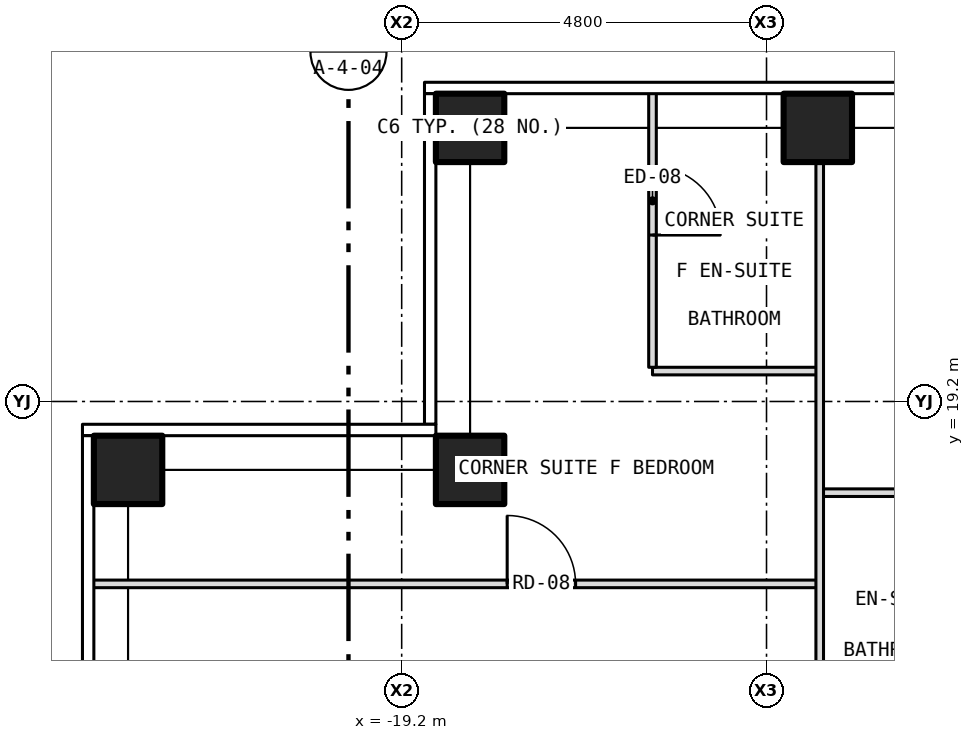
"""IFC4 building model, lengths in metres.
Left out: names, types, materials, properties, quantities, classifications, styles, units other than length and angle.
Written with IfcOpenShell. Run it as: python <this file> out.ifc"""

import sys

from ifc_helpers import new_model, si_unit, direction, frame, frame_2d, origin, origin_2d, place, context, subcontext, project, spatial, rectangle, hollow_rectangle, extrude, element, fill, save


model = new_model("IFC4")
c1 = context("Model", 3, precision=1e-05, world=origin(), true_north=direction((0.0, 1.0)))
c2 = subcontext(c1, "Body", "Model", "MODEL_VIEW")
j1 = project(units=[si_unit("LENGTHUNIT", "METRE"), si_unit("PLANEANGLEUNIT", "RADIAN")], contexts=[c1])
p1 = place(None, origin())
s1 = spatial("IfcSite", under=j1, at=p1, CompositionType="ELEMENT")
p2 = place(p1, origin())
s2 = spatial("IfcBuilding", under=s1, at=p2, CompositionType="ELEMENT")
p3 = place(p2, frame((0.0, 0.0, 117.0)))
s3 = spatial("IfcBuildingStorey", under=s2, at=p3, CompositionType="ELEMENT", Elevation=117.0)
for number, where, z_axis, x_axis in (
    (1, (-18.3, 22.8, -0.15), (0.0, 0.0, 1.0), (1.0, 0.0, 0.0)),
    (2, (-13.725, 22.8, -0.15), (0.0, 0.0, 1.0), (1.0, 0.0, 0.0)),
    (3, (-22.8, 18.3, -0.15), (0.0, 0.0, 1.0), (1.0, 0.0, 0.0)),
    (4, (-18.3, 18.3, -0.15), (0.0, 0.0, 1.0), (1.0, 0.0, 0.0)),
):
    element("IfcColumn", number, at=place(p3, frame(where, z_axis=z_axis, x_axis=x_axis)), inside=s3, PredefinedType="COLUMN", context=c2, shape_type="SweptSolid", body=[
        extrude(hollow_rectangle(XDim=0.9, YDim=0.9, WallThickness=0.05, at=origin_2d()), origin(), (0.0, 0.0, 1.0), 3.5),
    ])
p4 = place(p3, frame((-23.28, 16.8, 0.0), z_axis=(0.0, 0.0, 1.0), x_axis=(1.0, 0.0, 0.0)))
e5 = element("IfcWall", 5, at=p4, inside=s3, PredefinedType="PARTITIONING", context=c2, shape_type="SweptSolid", body=[
    extrude(rectangle(XDim=9.58, YDim=0.1, at=frame_2d((4.79, 0.0))), origin(), (0.0, 0.0, 1.0), 3.35),
])
p5 = place(p4, frame((5.468, 0.0, 0.0)))
e6 = element("IfcOpeningElement", 6, at=p5, cuts=e5, PredefinedType="OPENING", context=c2, shape_type="SweptSolid", body=[
    extrude(rectangle(XDim=0.9, YDim=2.1, at=frame_2d((0.45, 1.05))), frame((0.0, 0.062, 0.0), z_axis=(0.0, -1.0, 0.0), x_axis=(1.0, 0.0, 0.0)), (0.0, 0.0, 1.0), 0.124),
])
for number, where, z_axis, x_axis in (
    (7, (-13.7, 18.0, 0.0), (0.0, 0.0, 1.0), (1.0, 0.0, 0.0)),
    (8, (-15.9, 19.6, 0.0), (0.0, 0.0, 1.0), (1.0, 0.0, 0.0)),
):
    element("IfcWall", number, at=place(p3, frame(where, z_axis=z_axis, x_axis=x_axis)), inside=s3, PredefinedType="PARTITIONING", context=c2, shape_type="SweptSolid", body=[
        extrude(rectangle(XDim=2.2, YDim=0.1, at=frame_2d((1.1, 0.0))), origin(), (0.0, 0.0, 1.0), 3.35),
    ])
p6 = place(p3, frame((-15.9, 19.65, 0.0), z_axis=(0.0, 0.0, 1.0), x_axis=(0.0, 1.0, 0.0)))
e9 = element("IfcWall", 9, at=p6, inside=s3, PredefinedType="PARTITIONING", context=c2, shape_type="SweptSolid", body=[
    extrude(rectangle(XDim=3.63, YDim=0.1, at=frame_2d((1.815, 0.0))), origin(), (0.0, 0.0, 1.0), 3.35),
])
p7 = place(p6, frame((1.74, 0.0, 0.0)))
e10 = element("IfcOpeningElement", 10, at=p7, cuts=e9, PredefinedType="OPENING", context=c2, shape_type="SweptSolid", body=[
    extrude(rectangle(XDim=0.9, YDim=2.1, at=frame_2d((0.45, 1.05))), frame((0.0, 0.062, 0.0), z_axis=(0.0, -1.0, 0.0), x_axis=(1.0, 0.0, 0.0)), (0.0, 0.0, 1.0), 0.124),
])
p8 = place(p3, frame((-13.7, 14.875, 0.0), z_axis=(0.0, 0.0, 1.0), x_axis=(0.0, 1.0, 0.0)))
e11 = element("IfcWall", 11, at=p8, inside=s3, PredefinedType="PARTITIONING", context=c2, shape_type="SweptSolid", body=[
    extrude(rectangle(XDim=7.805, YDim=0.1, at=frame_2d((3.902, 0.0))), origin(), (0.0, 0.0, 1.0), 3.35),
])
p9 = place(p5, origin())
e12 = element("IfcDoor", 12, at=p9, inside=s3, OperationType="SINGLE_SWING_LEFT", PredefinedType="DOOR", context=c2, shape_type="SweptSolid", body=[
    extrude(rectangle(XDim=0.9, YDim=2.1, at=frame_2d((0.45, 1.05))), frame((0.0, 0.025, 0.0), z_axis=(0.0, -1.0, 0.0), x_axis=(1.0, 0.0, 0.0)), (0.0, 0.0, 1.0), 0.05),
])
fill(e6, e12)
p10 = place(p7, origin())
e13 = element("IfcDoor", 13, at=p10, inside=s3, OperationType="SINGLE_SWING_LEFT", PredefinedType="DOOR", context=c2, shape_type="SweptSolid", body=[
    extrude(rectangle(XDim=0.9, YDim=2.1, at=frame_2d((0.45, 1.05))), frame((0.0, 0.025, 0.0), z_axis=(0.0, -1.0, 0.0), x_axis=(1.0, 0.0, 0.0)), (0.0, 0.0, 1.0), 0.05),
])
fill(e10, e13)
save(model, sys.argv[1])
